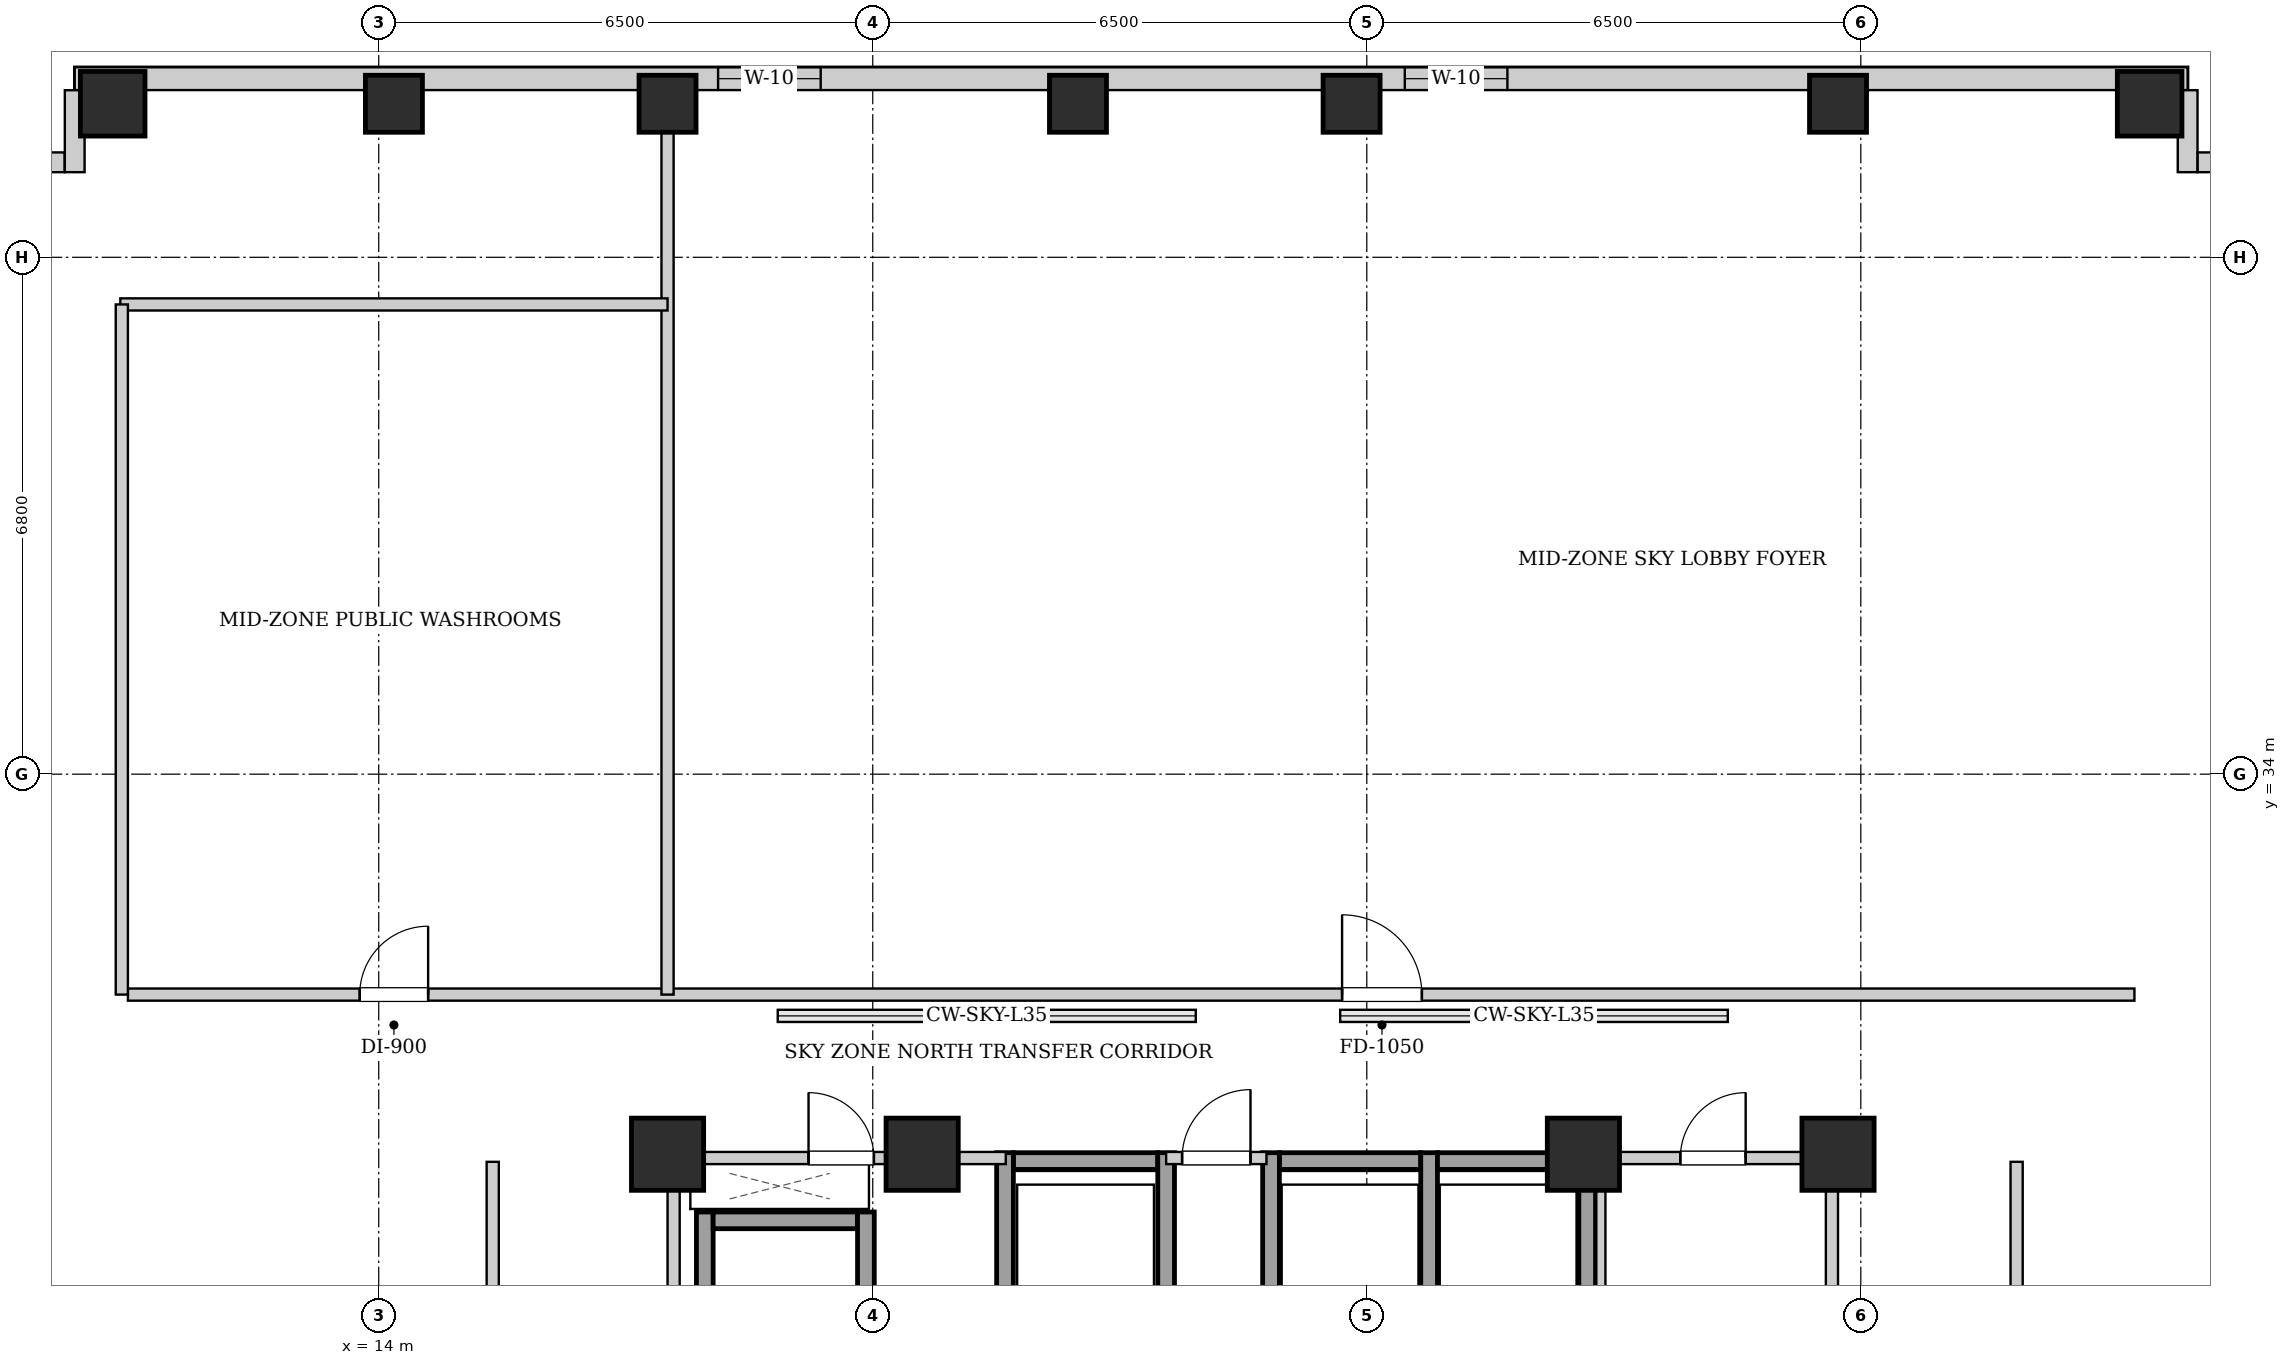
"""IFC4 building model, lengths in metres.
Left out: names, types, materials, properties, quantities, classifications, styles, units other than length and angle.
Written with IfcOpenShell. Run it as: python <this file> out.ifc"""

import sys

from ifc_helpers import new_model, si_unit, direction, frame, frame_2d, origin, origin_2d, place, context, subcontext, project, spatial, rectangle, extrude, element, fill, save


model = new_model("IFC4")
c1 = context("Model", 3, precision=1e-05, world=origin(), true_north=direction((0.0, 1.0)))
c2 = subcontext(c1, "Body", "Model", "MODEL_VIEW")
j1 = project(units=[si_unit("LENGTHUNIT", "METRE"), si_unit("PLANEANGLEUNIT", "RADIAN")], contexts=[c1])
p1 = place(None, origin())
s1 = spatial("IfcSite", under=j1, at=p1, CompositionType="ELEMENT")
p2 = place(p1, origin())
s2 = spatial("IfcBuilding", under=s1, at=p2, CompositionType="ELEMENT")
p3 = place(p2, frame((0.0, 0.0, 124.4)))
s3 = spatial("IfcBuildingStorey", under=s2, at=p3, CompositionType="ELEMENT", Elevation=124.4)
p4 = place(p3, frame((10.5, 42.82, 0.0), z_axis=(0.0, 0.0, 1.0), x_axis=(1.0, 0.0, 0.0)))
e1 = element("IfcColumn", 1, at=p4, inside=s3, PredefinedType="COLUMN", context=c2, shape_type="SweptSolid", body=[
    extrude(rectangle(XDim=0.85, YDim=0.85, at=origin_2d()), origin(), (0.0, 0.0, 1.0), 3.25),
])
for number, where, z_axis, x_axis in (
    (2, (14.2, 42.82, 0.0), (0.0, 0.0, 1.0), (1.0, 0.0, 0.0)),
    (3, (17.8, 42.82, 0.0), (0.0, 0.0, 1.0), (1.0, 0.0, 0.0)),
    (4, (23.2, 42.82, 0.0), (0.0, 0.0, 1.0), (1.0, 0.0, 0.0)),
    (5, (26.8, 42.82, 0.0), (0.0, 0.0, 1.0), (1.0, 0.0, 0.0)),
    (6, (33.2, 42.82, 0.0), (0.0, 0.0, 1.0), (1.0, 0.0, 0.0)),
):
    element("IfcColumn", number, at=place(p3, frame(where, z_axis=z_axis, x_axis=x_axis)), inside=s3, PredefinedType="COLUMN", context=c2, shape_type="SweptSolid", body=[
        extrude(rectangle(XDim=0.75, YDim=0.75, at=origin_2d()), origin(), (0.0, 0.0, 1.0), 3.25),
    ])
p5 = place(p3, frame((37.3, 42.82, 0.0), z_axis=(0.0, 0.0, 1.0), x_axis=(1.0, 0.0, 0.0)))
e7 = element("IfcColumn", 7, at=p5, inside=s3, PredefinedType="COLUMN", context=c2, shape_type="SweptSolid", body=[
    extrude(rectangle(XDim=0.85, YDim=0.85, at=origin_2d()), origin(), (0.0, 0.0, 1.0), 3.25),
])
for number, where, z_axis, x_axis in (
    (8, (17.8, 29.0, 0.0), (0.0, 0.0, 1.0), (1.0, 0.0, 0.0)),
    (9, (21.15, 29.0, 0.0), (0.0, 0.0, 1.0), (1.0, 0.0, 0.0)),
    (10, (29.85, 29.0, 0.0), (0.0, 0.0, 1.0), (1.0, 0.0, 0.0)),
    (11, (33.2, 29.0, 0.0), (0.0, 0.0, 1.0), (1.0, 0.0, 0.0)),
):
    element("IfcColumn", number, at=place(p3, frame(where, z_axis=z_axis, x_axis=x_axis)), inside=s3, PredefinedType="COLUMN", context=c2, shape_type="SweptSolid", body=[
        extrude(rectangle(XDim=0.95, YDim=0.95, at=origin_2d()), origin(), (0.0, 0.0, 1.0), 3.25),
    ])
p6 = place(p3, frame((10.0, 43.15, 0.0), z_axis=(0.0, 0.0, 1.0), x_axis=(1.0, 0.0, 0.0)))
e12 = element("IfcWall", 12, at=p6, inside=s3, PredefinedType="SOLIDWALL", context=c2, shape_type="SweptSolid", body=[
    extrude(rectangle(XDim=27.8, YDim=0.3, at=frame_2d((13.9, 0.0))), origin(), (0.0, 0.0, 1.0), 2.99),
])
p7 = place(p6, frame((17.5, 0.0, 0.55)))
e13 = element("IfcOpeningElement", 13, at=p7, cuts=e12, PredefinedType="OPENING", context=c2, shape_type="SweptSolid", body=[
    extrude(rectangle(XDim=1.35, YDim=1.2, at=frame_2d((0.675, 0.6))), frame((0.0, 0.16, 0.0), z_axis=(0.0, -1.0, 0.0), x_axis=(1.0, 0.0, 0.0)), (0.0, 0.0, 1.0), 0.32),
])
p8 = place(p6, frame((8.465, 0.0, 0.55)))
e14 = element("IfcOpeningElement", 14, at=p8, cuts=e12, PredefinedType="OPENING", context=c2, shape_type="SweptSolid", body=[
    extrude(rectangle(XDim=1.35, YDim=1.2, at=frame_2d((0.675, 0.6))), frame((0.0, 0.16, 0.0), z_axis=(0.0, -1.0, 0.0), x_axis=(1.0, 0.0, 0.0)), (0.0, 0.0, 1.0), 0.32),
])
p9 = place(p3, frame((8.882, 42.05, 0.0), z_axis=(0.0, 0.0, 1.0), x_axis=(1.0, 0.0, 0.0)))
e15 = element("IfcWall", 15, at=p9, inside=s3, PredefinedType="SOLIDWALL", context=c2, shape_type="SweptSolid", body=[
    extrude(rectangle(XDim=0.986, YDim=0.26, at=frame_2d((0.493, 0.0))), origin(), (0.0, 0.0, 1.0), 2.99),
])
for number, where, z_axis, x_axis in (
    (16, (10.0, 41.92, 0.0), (0.0, 0.0, 1.0), (0.0, 1.0, 0.0)),
    (17, (37.8, 42.998, 0.0), (0.0, 0.0, 1.0), (0.0, -1.0, 0.0)),
):
    element("IfcWall", number, at=place(p3, frame(where, z_axis=z_axis, x_axis=x_axis)), inside=s3, PredefinedType="SOLIDWALL", context=c2, shape_type="SweptSolid", body=[
        extrude(rectangle(XDim=1.078, YDim=0.26, at=frame_2d((0.539, 0.0))), origin(), (0.0, 0.0, 1.0), 2.99),
    ])
p10 = place(p3, frame((37.932, 42.05, 0.0), z_axis=(0.0, 0.0, 1.0), x_axis=(1.0, 0.0, 0.0)))
e18 = element("IfcWall", 18, at=p10, inside=s3, PredefinedType="SOLIDWALL", context=c2, shape_type="SweptSolid", body=[
    extrude(rectangle(XDim=1.248, YDim=0.26, at=frame_2d((0.624, 0.0))), origin(), (0.0, 0.0, 1.0), 2.99),
])
p11 = place(p3, frame((22.35, 28.91, 0.0), z_axis=(0.0, 0.0, 1.0), x_axis=(1.0, 0.0, 0.0)))
e19 = element("IfcWall", 19, at=p11, inside=s3, PredefinedType="SHEAR", context=c2, shape_type="SweptSolid", body=[
    extrude(rectangle(XDim=1.9, YDim=0.22, at=frame_2d((0.95, 0.0))), origin(), (0.0, 0.0, 1.0), 2.99),
])
for number, where, z_axis, x_axis in (
    (20, (22.24, 26.58, 0.0), (0.0, 0.0, 1.0), (0.0, 1.0, 0.0)),
    (21, (24.36, 26.58, 0.0), (0.0, 0.0, 1.0), (0.0, 1.0, 0.0)),
):
    element("IfcWall", number, at=place(p3, frame(where, z_axis=z_axis, x_axis=x_axis)), inside=s3, PredefinedType="SHEAR", context=c2, shape_type="SweptSolid", body=[
        extrude(rectangle(XDim=2.44, YDim=0.22, at=frame_2d((1.22, 0.0))), origin(), (0.0, 0.0, 1.0), 2.99),
    ])
p12 = place(p3, frame((25.85, 28.91, 0.0), z_axis=(0.0, 0.0, 1.0), x_axis=(1.0, 0.0, 0.0)))
e22 = element("IfcWall", 22, at=p12, inside=s3, PredefinedType="SHEAR", context=c2, shape_type="SweptSolid", body=[
    extrude(rectangle(XDim=1.86, YDim=0.22, at=frame_2d((0.93, 0.0))), origin(), (0.0, 0.0, 1.0), 2.99),
])
for number, where, z_axis, x_axis in (
    (23, (25.74, 26.58, 0.0), (0.0, 0.0, 1.0), (0.0, 1.0, 0.0)),
    (24, (27.82, 26.58, 0.0), (0.0, 0.0, 1.0), (0.0, 1.0, 0.0)),
):
    element("IfcWall", number, at=place(p3, frame(where, z_axis=z_axis, x_axis=x_axis)), inside=s3, PredefinedType="SHEAR", context=c2, shape_type="SweptSolid", body=[
        extrude(rectangle(XDim=2.44, YDim=0.22, at=frame_2d((1.22, 0.0))), origin(), (0.0, 0.0, 1.0), 2.99),
    ])
p13 = place(p3, frame((27.93, 28.91, 0.0), z_axis=(0.0, 0.0, 1.0), x_axis=(1.0, 0.0, 0.0)))
e25 = element("IfcWall", 25, at=p13, inside=s3, PredefinedType="SHEAR", context=c2, shape_type="SweptSolid", body=[
    extrude(rectangle(XDim=1.86, YDim=0.22, at=frame_2d((0.93, 0.0))), origin(), (0.0, 0.0, 1.0), 2.99),
])
p14 = place(p3, frame((29.9, 26.58, 0.0), z_axis=(0.0, 0.0, 1.0), x_axis=(0.0, 1.0, 0.0)))
e26 = element("IfcWall", 26, at=p14, inside=s3, PredefinedType="SHEAR", context=c2, shape_type="SweptSolid", body=[
    extrude(rectangle(XDim=2.44, YDim=0.22, at=frame_2d((1.22, 0.0))), origin(), (0.0, 0.0, 1.0), 2.99),
])
p15 = place(p3, frame((18.29, 24.1, 0.0), z_axis=(0.0, 0.0, 1.0), x_axis=(0.0, 1.0, 0.0)))
e27 = element("IfcWall", 27, at=p15, inside=s3, PredefinedType="SHEAR", context=c2, shape_type="SweptSolid", body=[
    extrude(rectangle(XDim=4.14, YDim=0.22, at=frame_2d((2.07, 0.0))), origin(), (0.0, 0.0, 1.0), 2.99),
])
p16 = place(p3, frame((18.4, 28.13, 0.0), z_axis=(0.0, 0.0, 1.0), x_axis=(1.0, 0.0, 0.0)))
e28 = element("IfcWall", 28, at=p16, inside=s3, PredefinedType="SHEAR", context=c2, shape_type="SweptSolid", body=[
    extrude(rectangle(XDim=1.9, YDim=0.22, at=frame_2d((0.95, 0.0))), origin(), (0.0, 0.0, 1.0), 2.99),
])
p17 = place(p3, frame((20.41, 26.06, 0.0), z_axis=(0.0, 0.0, 1.0), x_axis=(0.0, 1.0, 0.0)))
e29 = element("IfcWall", 29, at=p17, inside=s3, PredefinedType="SHEAR", context=c2, shape_type="SweptSolid", body=[
    extrude(rectangle(XDim=2.18, YDim=0.22, at=frame_2d((1.09, 0.0))), origin(), (0.0, 0.0, 1.0), 2.99),
])
for number, where, z_axis, x_axis in (
    (30, (17.88, 24.12, 0.0), (0.0, 0.0, 1.0), (0.0, 1.0, 0.0)),
    (31, (33.12, 24.12, 0.0), (0.0, 0.0, 1.0), (0.0, 1.0, 0.0)),
):
    element("IfcWall", number, at=place(p3, frame(where, z_axis=z_axis, x_axis=x_axis)), inside=s3, PredefinedType="PARTITIONING", context=c2, shape_type="SweptSolid", body=[
        extrude(rectangle(XDim=4.76, YDim=0.16, at=frame_2d((2.38, 0.0))), origin(), (0.0, 0.0, 1.0), 2.99),
    ])
p18 = place(p3, frame((24.36, 28.95, 0.0), z_axis=(0.0, 0.0, 1.0), x_axis=(1.0, 0.0, 0.0)))
e32 = element("IfcWall", 32, at=p18, inside=s3, PredefinedType="PARTITIONING", context=c2, shape_type="SweptSolid", body=[
    extrude(rectangle(XDim=1.32, YDim=0.16, at=frame_2d((0.66, 0.0))), origin(), (0.0, 0.0, 1.0), 2.426),
])
p19 = place(p18, frame((0.21, 0.0, 0.0)))
e33 = element("IfcOpeningElement", 33, at=p19, cuts=e32, PredefinedType="OPENING", context=c2, shape_type="SweptSolid", body=[
    extrude(rectangle(XDim=0.9, YDim=2.05, at=frame_2d((0.45, 1.025))), frame((0.0, 0.09, 0.0), z_axis=(0.0, -1.0, 0.0), x_axis=(1.0, 0.0, 0.0)), (0.0, 0.0, 1.0), 0.18),
])
p20 = place(p3, frame((17.96, 28.95, 0.0), z_axis=(0.0, 0.0, 1.0), x_axis=(1.0, 0.0, 0.0)))
e34 = element("IfcWall", 34, at=p20, inside=s3, PredefinedType="PARTITIONING", context=c2, shape_type="SweptSolid", body=[
    extrude(rectangle(XDim=4.29, YDim=0.16, at=frame_2d((2.145, 0.0))), origin(), (0.0, 0.0, 1.0), 2.426),
])
p21 = place(p20, frame((1.695, 0.0, 0.0)))
e35 = element("IfcOpeningElement", 35, at=p21, cuts=e34, PredefinedType="OPENING", context=c2, shape_type="SweptSolid", body=[
    extrude(rectangle(XDim=0.86, YDim=2.05, at=frame_2d((0.43, 1.025))), frame((0.0, 0.09, 0.0), z_axis=(0.0, -1.0, 0.0), x_axis=(1.0, 0.0, 0.0)), (0.0, 0.0, 1.0), 0.18),
])
p22 = place(p3, frame((30.08, 26.18, 0.0), z_axis=(0.0, 0.0, 1.0), x_axis=(0.0, 1.0, 0.0)))
e36 = element("IfcWall", 36, at=p22, inside=s3, PredefinedType="PARTITIONING", context=c2, shape_type="SweptSolid", body=[
    extrude(rectangle(XDim=2.68, YDim=0.12, at=frame_2d((1.34, 0.0))), origin(), (0.0, 0.0, 1.0), 2.99),
])
p23 = place(p3, frame((30.08, 28.95, 0.0), z_axis=(0.0, 0.0, 1.0), x_axis=(1.0, 0.0, 0.0)))
e37 = element("IfcWall", 37, at=p23, inside=s3, PredefinedType="PARTITIONING", context=c2, shape_type="SweptSolid", body=[
    extrude(rectangle(XDim=2.96, YDim=0.16, at=frame_2d((1.48, 0.0))), origin(), (0.0, 0.0, 1.0), 2.99),
])
p24 = place(p23, frame((1.045, 0.0, 0.0)))
e38 = element("IfcOpeningElement", 38, at=p24, cuts=e37, PredefinedType="OPENING", context=c2, shape_type="SweptSolid", body=[
    extrude(rectangle(XDim=0.86, YDim=2.05, at=frame_2d((0.43, 1.025))), frame((0.0, 0.09, 0.0), z_axis=(0.0, -1.0, 0.0), x_axis=(1.0, 0.0, 0.0)), (0.0, 0.0, 1.0), 0.18),
])
p25 = place(p3, frame((10.7, 31.1, 0.0), z_axis=(0.0, 0.0, 1.0), x_axis=(1.0, 0.0, 0.0)))
e39 = element("IfcWall", 39, at=p25, inside=s3, PredefinedType="PARTITIONING", context=c2, shape_type="SweptSolid", body=[
    extrude(rectangle(XDim=26.4, YDim=0.16, at=frame_2d((13.2, 0.0))), origin(), (0.0, 0.0, 1.0), 2.99),
])
p26 = place(p25, frame((3.05, 0.0, 0.0)))
e40 = element("IfcOpeningElement", 40, at=p26, cuts=e39, PredefinedType="OPENING", context=c2, shape_type="SweptSolid", body=[
    extrude(rectangle(XDim=0.9, YDim=2.05, at=frame_2d((0.45, 1.025))), frame((0.0, 0.09, 0.0), z_axis=(0.0, -1.0, 0.0), x_axis=(1.0, 0.0, 0.0)), (0.0, 0.0, 1.0), 0.18),
])
p27 = place(p25, frame((15.975, 0.0, 0.0)))
e41 = element("IfcOpeningElement", 41, at=p27, cuts=e39, PredefinedType="OPENING", context=c2, shape_type="SweptSolid", body=[
    extrude(rectangle(XDim=1.05, YDim=2.05, at=frame_2d((0.525, 1.025))), frame((0.0, 0.09, 0.0), z_axis=(0.0, -1.0, 0.0), x_axis=(1.0, 0.0, 0.0)), (0.0, 0.0, 1.0), 0.18),
])
p28 = place(p3, frame((17.8, 31.1, 0.0), z_axis=(0.0, 0.0, 1.0), x_axis=(0.0, 1.0, 0.0)))
e42 = element("IfcWall", 42, at=p28, inside=s3, PredefinedType="PARTITIONING", context=c2, shape_type="SweptSolid", body=[
    extrude(rectangle(XDim=11.9, YDim=0.16, at=frame_2d((5.95, 0.0))), origin(), (0.0, 0.0, 1.0), 2.426),
])
p29 = place(p3, frame((10.6, 40.18, 0.0), z_axis=(0.0, 0.0, 1.0), x_axis=(1.0, 0.0, 0.0)))
e43 = element("IfcWall", 43, at=p29, inside=s3, PredefinedType="PARTITIONING", context=c2, shape_type="SweptSolid", body=[
    extrude(rectangle(XDim=7.2, YDim=0.16, at=frame_2d((3.6, 0.0))), origin(), (0.0, 0.0, 1.0), 2.99),
])
p30 = place(p3, frame((10.62, 31.1, 0.0), z_axis=(0.0, 0.0, 1.0), x_axis=(0.0, 1.0, 0.0)))
e44 = element("IfcWall", 44, at=p30, inside=s3, PredefinedType="PARTITIONING", context=c2, shape_type="SweptSolid", body=[
    extrude(rectangle(XDim=9.08, YDim=0.16, at=frame_2d((4.54, 0.0))), origin(), (0.0, 0.0, 1.0), 2.99),
])
p31 = place(p3, frame((15.5, 15.1, 0.0), z_axis=(0.0, 0.0, 1.0), x_axis=(0.0, 1.0, 0.0)))
e45 = element("IfcWall", 45, at=p31, inside=s3, PredefinedType="PARTITIONING", context=c2, shape_type="SweptSolid", body=[
    extrude(rectangle(XDim=13.8, YDim=0.16, at=frame_2d((6.9, 0.0))), origin(), (0.0, 0.0, 1.0), 2.99),
])
p32 = place(p31, frame((6.475, 0.0, 0.0)))
e46 = element("IfcOpeningElement", 46, at=p32, cuts=e45, PredefinedType="OPENING", context=c2, shape_type="SweptSolid", body=[
    extrude(rectangle(XDim=1.05, YDim=2.05, at=frame_2d((0.525, 1.025))), frame((0.0, 0.09, 0.0), z_axis=(0.0, -1.0, 0.0), x_axis=(1.0, 0.0, 0.0)), (0.0, 0.0, 1.0), 0.18),
])
p33 = place(p3, frame((35.55, 15.1, 0.0), z_axis=(0.0, 0.0, 1.0), x_axis=(0.0, 1.0, 0.0)))
e47 = element("IfcWall", 47, at=p33, inside=s3, PredefinedType="PARTITIONING", context=c2, shape_type="SweptSolid", body=[
    extrude(rectangle(XDim=13.8, YDim=0.16, at=frame_2d((6.9, 0.0))), origin(), (0.0, 0.0, 1.0), 2.99),
])
p34 = place(p33, frame((6.475, 0.0, 0.0)))
e48 = element("IfcOpeningElement", 48, at=p34, cuts=e47, PredefinedType="OPENING", context=c2, shape_type="SweptSolid", body=[
    extrude(rectangle(XDim=1.05, YDim=2.05, at=frame_2d((0.525, 1.025))), frame((0.0, 0.09, 0.0), z_axis=(0.0, -1.0, 0.0), x_axis=(1.0, 0.0, 0.0)), (0.0, 0.0, 1.0), 0.18),
])
p35 = place(p19, origin())
e49 = element("IfcDoor", 49, at=p35, inside=s3, OperationType="SINGLE_SWING_RIGHT", PredefinedType="DOOR", context=c2, shape_type="SweptSolid", body=[
    extrude(rectangle(XDim=0.9, YDim=2.05, at=frame_2d((0.45, 1.025))), frame((0.0, 0.025, 0.0), z_axis=(0.0, -1.0, 0.0), x_axis=(1.0, 0.0, 0.0)), (0.0, 0.0, 1.0), 0.05),
])
fill(e33, e49)
p36 = place(p21, origin())
e50 = element("IfcDoor", 50, at=p36, inside=s3, OperationType="SINGLE_SWING_LEFT", PredefinedType="DOOR", context=c2, shape_type="SweptSolid", body=[
    extrude(rectangle(XDim=0.86, YDim=2.05, at=frame_2d((0.43, 1.025))), frame((0.0, 0.025, 0.0), z_axis=(0.0, -1.0, 0.0), x_axis=(1.0, 0.0, 0.0)), (0.0, 0.0, 1.0), 0.05),
])
fill(e35, e50)
p37 = place(p24, origin())
e51 = element("IfcDoor", 51, at=p37, inside=s3, OperationType="SINGLE_SWING_RIGHT", PredefinedType="DOOR", context=c2, shape_type="SweptSolid", body=[
    extrude(rectangle(XDim=0.86, YDim=2.05, at=frame_2d((0.43, 1.025))), frame((0.0, 0.025, 0.0), z_axis=(0.0, -1.0, 0.0), x_axis=(1.0, 0.0, 0.0)), (0.0, 0.0, 1.0), 0.05),
])
fill(e38, e51)
p38 = place(p26, origin())
e52 = element("IfcDoor", 52, at=p38, inside=s3, OperationType="SINGLE_SWING_RIGHT", PredefinedType="DOOR", context=c2, shape_type="SweptSolid", body=[
    extrude(rectangle(XDim=0.9, YDim=2.05, at=frame_2d((0.45, 1.025))), frame((0.0, 0.025, 0.0), z_axis=(0.0, -1.0, 0.0), x_axis=(1.0, 0.0, 0.0)), (0.0, 0.0, 1.0), 0.05),
])
fill(e40, e52)
p39 = place(p27, origin())
e53 = element("IfcDoor", 53, at=p39, inside=s3, OperationType="SINGLE_SWING_LEFT", PredefinedType="DOOR", context=c2, shape_type="SweptSolid", body=[
    extrude(rectangle(XDim=1.05, YDim=2.05, at=frame_2d((0.525, 1.025))), frame((0.0, 0.025, 0.0), z_axis=(0.0, -1.0, 0.0), x_axis=(1.0, 0.0, 0.0)), (0.0, 0.0, 1.0), 0.05),
])
fill(e41, e53)
p40 = place(p7, origin())
e54 = element("IfcWindow", 54, at=p40, inside=s3, PartitioningType="SINGLE_PANEL", PredefinedType="WINDOW", context=c2, shape_type="SweptSolid", body=[
    extrude(rectangle(XDim=1.35, YDim=1.2, at=frame_2d((0.675, 0.6))), frame((0.0, 0.03, 0.0), z_axis=(0.0, -1.0, 0.0), x_axis=(1.0, 0.0, 0.0)), (0.0, 0.0, 1.0), 0.06),
])
fill(e13, e54)
p41 = place(p8, origin())
e55 = element("IfcWindow", 55, at=p41, inside=s3, PartitioningType="SINGLE_PANEL", PredefinedType="WINDOW", context=c2, shape_type="SweptSolid", body=[
    extrude(rectangle(XDim=1.35, YDim=1.2, at=frame_2d((0.675, 0.6))), frame((0.0, 0.03, 0.0), z_axis=(0.0, -1.0, 0.0), x_axis=(1.0, 0.0, 0.0)), (0.0, 0.0, 1.0), 0.06),
])
fill(e14, e55)
save(model, sys.argv[1])
